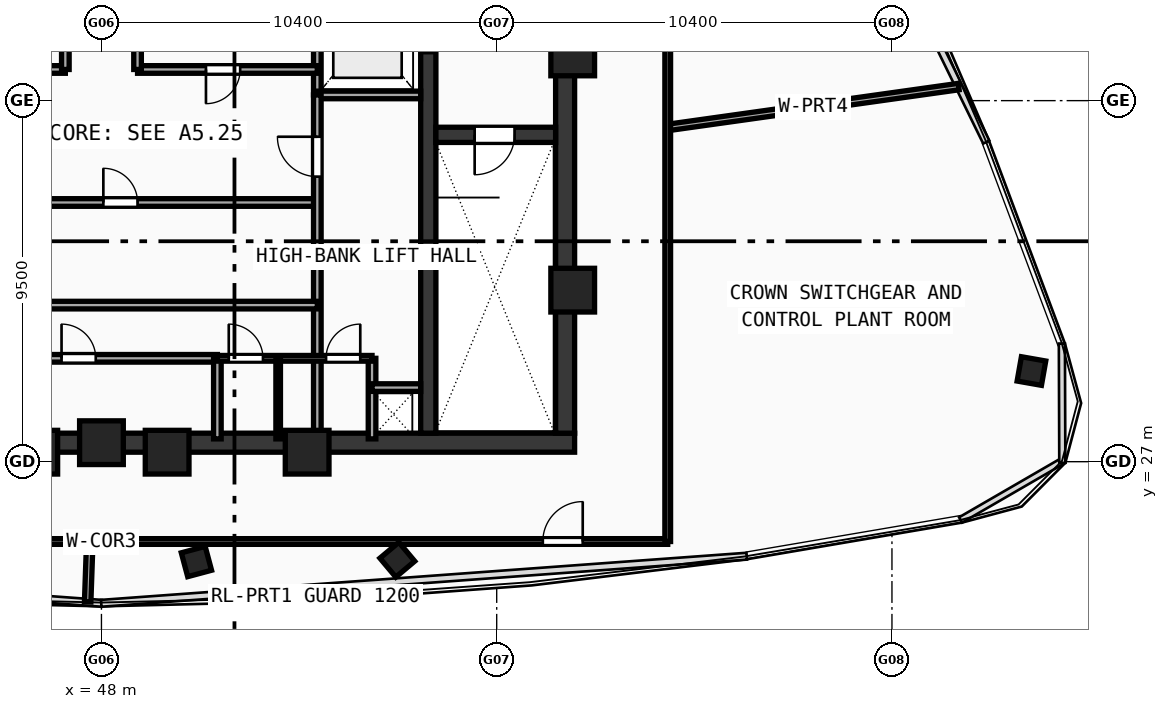
"""IFC4 building model, lengths in metres.
Left out: names, types, materials, properties, quantities, classifications, styles, units other than length and angle.
Written with IfcOpenShell. Run it as: python <this file> out.ifc"""

import sys

from ifc_helpers import new_model, si_unit, direction, frame, frame_2d, origin, origin_with_axes, origin_2d, place, context, subcontext, project, spatial, rectangle, hollow_rectangle, extrude, source, transform, mapped, element, fill, save


model = new_model("IFC4")
c1 = context("Model", 3, precision=1e-05, world=origin(), true_north=direction((0.0, 1.0)))
c2 = subcontext(c1, "Body", "Model", "MODEL_VIEW")
j1 = project(units=[si_unit("LENGTHUNIT", "METRE"), si_unit("PLANEANGLEUNIT", "RADIAN")], contexts=[c1])
p1 = place(None, origin())
s1 = spatial("IfcSite", under=j1, at=p1, CompositionType="ELEMENT")
p2 = place(p1, origin())
s2 = spatial("IfcBuilding", under=s1, at=p2, CompositionType="ELEMENT")
p3 = place(p2, frame((0.0, 0.0, 396.76)))
s3 = spatial("IfcBuildingStorey", under=s2, at=p3, CompositionType="ELEMENT", Elevation=396.76)
p4 = place(p3, frame((35.55, 27.5, 0.0), z_axis=(0.0, 0.0, 1.0), x_axis=(1.0, 0.0, 0.0)))
e1 = element("IfcWall", 1, at=p4, inside=s3, PredefinedType="SHEAR", context=c2, shape_type="SweptSolid", body=[
    extrude(rectangle(XDim=24.9, YDim=0.5, at=frame_2d((12.45, 0.0))), origin(), (0.0, 0.0, 1.0), 4.72),
])
p5 = place(p3, frame((60.2, 27.75, 0.0), z_axis=(0.0, 0.0, 1.0), x_axis=(0.0, 1.0, 0.0)))
e2 = element("IfcWall", 2, at=p5, inside=s3, PredefinedType="SHEAR", context=c2, shape_type="SweptSolid", body=[
    extrude(rectangle(XDim=12.2, YDim=0.5, at=frame_2d((6.1, 0.0))), origin(), (0.0, 0.0, 1.0), 4.72),
])
p6 = place(p3, frame((56.6, 27.75, 0.0), z_axis=(0.0, 0.0, 1.0), x_axis=(0.0, 1.0, 0.0)))
e3 = element("IfcWall", 3, at=p6, inside=s3, PredefinedType="SHEAR", context=c2, shape_type="SweptSolid", body=[
    extrude(rectangle(XDim=12.2, YDim=0.4, at=frame_2d((6.1, 0.0))), origin(), (0.0, 0.0, 1.0), 4.72),
])
p7 = place(p6, frame((10.0, 0.0, 0.0)))
e4 = element("IfcOpeningElement", 4, at=p7, cuts=e3, PredefinedType="OPENING", context=c2, shape_type="SweptSolid", body=[
    extrude(rectangle(XDim=1.1, YDim=2.1, at=frame_2d((0.55, 1.05))), frame((0.0, 0.21, 0.0), z_axis=(0.0, -1.0, 0.0), x_axis=(1.0, 0.0, 0.0)), (0.0, 0.0, 1.0), 0.42),
])
p8 = place(p3, frame((56.8, 35.6, 0.0), z_axis=(0.0, 0.0, 1.0), x_axis=(1.0, 0.0, 0.0)))
e5 = element("IfcWall", 5, at=p8, inside=s3, PredefinedType="SHEAR", context=c2, shape_type="SweptSolid", body=[
    extrude(rectangle(XDim=3.15, YDim=0.4, at=frame_2d((1.575, 0.0))), origin(), (0.0, 0.0, 1.0), 4.72),
])
p9 = place(p8, frame((1.02, 0.0, 0.0)))
e6 = element("IfcOpeningElement", 6, at=p9, cuts=e5, PredefinedType="OPENING", context=c2, shape_type="SweptSolid", body=[
    extrude(rectangle(XDim=1.05, YDim=2.1, at=frame_2d((0.525, 1.05))), frame((0.0, 0.21, 0.0), z_axis=(0.0, -1.0, 0.0), x_axis=(1.0, 0.0, 0.0)), (0.0, 0.0, 1.0), 0.42),
])
m1 = source(origin(), c2, "Body", "SweptSolid", [
    extrude(hollow_rectangle(XDim=1.15, YDim=1.15, WallThickness=0.048, at=origin_2d()), origin(), (0.0, 0.0, 1.0), 5.0),
])
for number, where, z_axis, x_axis in (
    (7, (46.272, 27.25, -0.28), (0.0, 0.0, 1.0), (1.0, 0.0, 0.0)),
    (8, (49.729, 27.25, -0.28), (0.0, 0.0, 1.0), (1.0, 0.0, 0.0)),
    (9, (53.412, 27.25, -0.28), (0.0, 0.0, 1.0), (1.0, 0.0, 0.0)),
    (10, (60.4, 31.513, -0.28), (0.0, 0.0, 1.0), (1.0, 0.0, 0.0)),
    (11, (60.4, 37.729, -0.28), (0.0, 0.0, 1.0), (1.0, 0.0, 0.0)),
):
    element("IfcColumn", number, at=place(p3, frame(where, z_axis=z_axis, x_axis=x_axis)), inside=s3, PredefinedType="COLUMN", context=c2, shape_type="MappedRepresentation", body=[
        mapped(m1, transform((0.0, 0.0, 0.0), scale=1.0)),
    ])
m2 = source(origin(), c2, "Body", "SweptSolid", [
    extrude(hollow_rectangle(XDim=0.65, YDim=0.65, WallThickness=0.024, at=origin_2d()), origin(), (0.0, 0.0, 1.0), 5.0),
])
for number, where, z_axis, x_axis in (
    (12, (50.499, 24.373, -0.28), (0.0, 0.0, 1.0), (0.966, 0.259, 0.0)),
    (13, (55.785, 24.422, -0.28), (0.0, 0.0, 1.0), (0.766, 0.643, 0.0)),
    (14, (72.47, 29.385, -0.28), (0.0, 0.0, 1.0), (0.174, 0.985, 0.0)),
):
    element("IfcColumn", number, at=place(p3, frame(where, z_axis=z_axis, x_axis=x_axis)), inside=s3, PredefinedType="COLUMN", context=c2, shape_type="MappedRepresentation", body=[
        mapped(m2, transform((0.0, 0.0, 0.0), scale=1.0)),
    ])
p10 = place(p3, frame((48.0, 27.5, -0.28), z_axis=(0.0, 0.0, 1.0), x_axis=(1.0, 0.0, 0.0)))
e15 = element("IfcColumn", 15, at=p10, inside=s3, PredefinedType="COLUMN", context=c2, shape_type="MappedRepresentation", body=[
    mapped(m1, transform((0.0, 0.0, 0.0), scale=1.0)),
])
p11 = place(p3, frame((53.68, 36.65, 0.0), z_axis=(0.0, 0.0, 1.0), x_axis=(0.0, 1.0, 0.0)))
e16 = element("IfcWall", 16, at=p11, inside=s3, PredefinedType="SOLIDWALL", context=c2, shape_type="SweptSolid", body=[
    extrude(rectangle(XDim=3.3, YDim=0.2, at=frame_2d((1.65, 0.0))), origin(), (0.0, 0.0, 1.0), 4.72),
])
p12 = place(p3, frame((53.68, 36.65, 0.0), z_axis=(0.0, 0.0, 1.0), x_axis=(1.0, 0.0, 0.0)))
e17 = element("IfcWall", 17, at=p12, inside=s3, PredefinedType="SOLIDWALL", context=c2, shape_type="SweptSolid", body=[
    extrude(rectangle(XDim=2.72, YDim=0.2, at=frame_2d((1.36, 0.0))), origin(), (0.0, 0.0, 1.0), 4.72),
])
p13 = place(p3, frame((42.32, 37.32, 0.0), z_axis=(0.0, 0.0, 1.0), x_axis=(1.0, 0.0, 0.0)))
e18 = element("IfcWall", 18, at=p13, inside=s3, PredefinedType="SOLIDWALL", context=c2, shape_type="SweptSolid", body=[
    extrude(rectangle(XDim=4.73, YDim=0.2, at=frame_2d((2.365, 0.0))), origin(), (0.0, 0.0, 1.0), 4.72),
])
p14 = place(p13, frame((1.8, 0.0, 0.0)))
e19 = element("IfcOpeningElement", 19, at=p14, cuts=e18, PredefinedType="OPENING", context=c2, shape_type="SweptSolid", body=[
    extrude(rectangle(XDim=0.9, YDim=2.1, at=frame_2d((0.45, 1.05))), frame((0.0, 0.11, 0.0), z_axis=(0.0, -1.0, 0.0), x_axis=(1.0, 0.0, 0.0)), (0.0, 0.0, 1.0), 0.22),
])
p15 = place(p3, frame((48.95, 37.32, 0.0), z_axis=(0.0, 0.0, 1.0), x_axis=(1.0, 0.0, 0.0)))
e20 = element("IfcWall", 20, at=p15, inside=s3, PredefinedType="SOLIDWALL", context=c2, shape_type="SweptSolid", body=[
    extrude(rectangle(XDim=4.73, YDim=0.2, at=frame_2d((2.365, 0.0))), origin(), (0.0, 0.0, 1.0), 4.72),
])
p16 = place(p15, frame((1.8, 0.0, 0.0)))
e21 = element("IfcOpeningElement", 21, at=p16, cuts=e20, PredefinedType="OPENING", context=c2, shape_type="SweptSolid", body=[
    extrude(rectangle(XDim=0.9, YDim=2.1, at=frame_2d((0.45, 1.05))), frame((0.0, 0.11, 0.0), z_axis=(0.0, -1.0, 0.0), x_axis=(1.0, 0.0, 0.0)), (0.0, 0.0, 1.0), 0.22),
])
for number, where, z_axis, x_axis in (
    (22, (47.05, 37.32, 0.0), (0.0, 0.0, 1.0), (0.0, 1.0, 0.0)),
    (23, (48.95, 37.32, 0.0), (0.0, 0.0, 1.0), (0.0, 1.0, 0.0)),
):
    element("IfcWall", number, at=place(p3, frame(where, z_axis=z_axis, x_axis=x_axis)), inside=s3, PredefinedType="SOLIDWALL", context=c2, shape_type="SweptSolid", body=[
        extrude(rectangle(XDim=2.63, YDim=0.2, at=frame_2d((1.315, 0.0))), origin(), (0.0, 0.0, 1.0), 4.72),
    ])
p17 = place(p3, frame((43.85, 33.82, 0.0), z_axis=(0.0, 0.0, 1.0), x_axis=(1.0, 0.0, 0.0)))
e24 = element("IfcWall", 24, at=p17, inside=s3, PredefinedType="SOLIDWALL", context=c2, shape_type="SweptSolid", body=[
    extrude(rectangle(XDim=9.83, YDim=0.2, at=frame_2d((4.915, 0.0))), origin(), (0.0, 0.0, 1.0), 4.72),
])
p18 = place(p17, frame((4.2, 0.0, 0.0)))
e25 = element("IfcOpeningElement", 25, at=p18, cuts=e24, PredefinedType="OPENING", context=c2, shape_type="SweptSolid", body=[
    extrude(rectangle(XDim=0.9, YDim=2.1, at=frame_2d((0.45, 1.05))), frame((0.0, 0.11, 0.0), z_axis=(0.0, -1.0, 0.0), x_axis=(1.0, 0.0, 0.0)), (0.0, 0.0, 1.0), 0.22),
])
p19 = place(p3, frame((53.68, 27.6, 0.0), z_axis=(0.0, 0.0, 1.0), x_axis=(0.0, 1.0, 0.0)))
e26 = element("IfcWall", 26, at=p19, inside=s3, PredefinedType="SOLIDWALL", context=c2, shape_type="SweptSolid", body=[
    extrude(rectangle(XDim=9.05, YDim=0.2, at=frame_2d((4.525, 0.0))), origin(), (0.0, 0.0, 1.0), 4.72),
])
p20 = place(p19, frame((6.9, 0.0, 0.0)))
e27 = element("IfcOpeningElement", 27, at=p20, cuts=e26, PredefinedType="OPENING", context=c2, shape_type="SweptSolid", body=[
    extrude(rectangle(XDim=1.05, YDim=2.1, at=frame_2d((0.525, 1.05))), frame((0.0, 0.11, 0.0), z_axis=(0.0, -1.0, 0.0), x_axis=(1.0, 0.0, 0.0)), (0.0, 0.0, 1.0), 0.22),
])
p21 = place(p3, frame((43.85, 29.72, 0.0), z_axis=(0.0, 0.0, 1.0), x_axis=(1.0, 0.0, 0.0)))
e28 = element("IfcWall", 28, at=p21, inside=s3, PredefinedType="SOLIDWALL", context=c2, shape_type="SweptSolid", body=[
    extrude(rectangle(XDim=7.2, YDim=0.2, at=frame_2d((3.6, 0.0))), origin(), (0.0, 0.0, 1.0), 4.72),
])
p22 = place(p21, frame((3.1, 0.0, 0.0)))
e29 = element("IfcOpeningElement", 29, at=p22, cuts=e28, PredefinedType="OPENING", context=c2, shape_type="SweptSolid", body=[
    extrude(rectangle(XDim=0.9, YDim=2.1, at=frame_2d((0.45, 1.05))), frame((0.0, 0.11, 0.0), z_axis=(0.0, -1.0, 0.0), x_axis=(1.0, 0.0, 0.0)), (0.0, 0.0, 1.0), 0.22),
])
p23 = place(p3, frame((51.05, 27.6, 0.0), z_axis=(0.0, 0.0, 1.0), x_axis=(0.0, 1.0, 0.0)))
e30 = element("IfcWall", 30, at=p23, inside=s3, PredefinedType="SOLIDWALL", context=c2, shape_type="SweptSolid", body=[
    extrude(rectangle(XDim=2.12, YDim=0.2, at=frame_2d((1.06, 0.0))), origin(), (0.0, 0.0, 1.0), 4.72),
])
p24 = place(p3, frame((43.85, 31.12, 0.0), z_axis=(0.0, 0.0, 1.0), x_axis=(1.0, 0.0, 0.0)))
e31 = element("IfcWall", 31, at=p24, inside=s3, PredefinedType="SOLIDWALL", context=c2, shape_type="SweptSolid", body=[
    extrude(rectangle(XDim=9.83, YDim=0.2, at=frame_2d((4.915, 0.0))), origin(), (0.0, 0.0, 1.0), 4.72),
])
p25 = place(p3, frame((55.12, 27.6, 0.0), z_axis=(0.0, 0.0, 1.0), x_axis=(0.0, 1.0, 0.0)))
e32 = element("IfcWall", 32, at=p25, inside=s3, PredefinedType="SOLIDWALL", context=c2, shape_type="SweptSolid", body=[
    extrude(rectangle(XDim=2.12, YDim=0.2, at=frame_2d((1.06, 0.0))), origin(), (0.0, 0.0, 1.0), 4.72),
])
p26 = place(p3, frame((55.12, 28.95, 0.0), z_axis=(0.0, 0.0, 1.0), x_axis=(1.0, 0.0, 0.0)))
e33 = element("IfcWall", 33, at=p26, inside=s3, PredefinedType="SOLIDWALL", context=c2, shape_type="SweptSolid", body=[
    extrude(rectangle(XDim=1.28, YDim=0.2, at=frame_2d((0.64, 0.0))), origin(), (0.0, 0.0, 1.0), 4.72),
])
p27 = place(p3, frame((51.05, 29.72, 0.0), z_axis=(0.0, 0.0, 1.0), x_axis=(1.0, 0.0, 0.0)))
e34 = element("IfcWall", 34, at=p27, inside=s3, PredefinedType="PARTITIONING", context=c2, shape_type="SweptSolid", body=[
    extrude(rectangle(XDim=4.07, YDim=0.15, at=frame_2d((2.035, 0.0))), origin(), (0.0, 0.0, 1.0), 4.72),
])
p28 = place(p27, frame((0.3, 0.0, 0.0)))
e35 = element("IfcOpeningElement", 35, at=p28, cuts=e34, PredefinedType="OPENING", context=c2, shape_type="SweptSolid", body=[
    extrude(rectangle(XDim=0.9, YDim=2.1, at=frame_2d((0.45, 1.05))), frame((0.0, 0.085, 0.0), z_axis=(0.0, -1.0, 0.0), x_axis=(1.0, 0.0, 0.0)), (0.0, 0.0, 1.0), 0.17),
])
p29 = place(p27, frame((2.86, 0.0, 0.0)))
e36 = element("IfcOpeningElement", 36, at=p29, cuts=e34, PredefinedType="OPENING", context=c2, shape_type="SweptSolid", body=[
    extrude(rectangle(XDim=0.9, YDim=2.1, at=frame_2d((0.45, 1.05))), frame((0.0, 0.085, 0.0), z_axis=(0.0, -1.0, 0.0), x_axis=(1.0, 0.0, 0.0)), (0.0, 0.0, 1.0), 0.17),
])
p30 = place(p3, frame((52.65, 27.6, 0.0), z_axis=(0.0, 0.0, 1.0), x_axis=(0.0, 1.0, 0.0)))
e37 = element("IfcWall", 37, at=p30, inside=s3, PredefinedType="PARTITIONING", context=c2, shape_type="SweptSolid", body=[
    extrude(rectangle(XDim=2.12, YDim=0.12, at=frame_2d((1.06, 0.0))), origin(), (0.0, 0.0, 1.0), 4.72),
])
p31 = place(p3, frame((62.9, 35.794, 0.0), z_axis=(0.0, 0.0, 1.0), x_axis=(0.990268414718, 0.139170639188, 0.0)))
e38 = element("IfcWall", 38, at=p31, inside=s3, PredefinedType="PARTITIONING", context=c2, shape_type="SweptSolid", body=[
    extrude(rectangle(XDim=7.731, YDim=0.17, at=frame_2d((3.865, 0.0))), origin(), (0.0, 0.0, 1.0), 4.12),
])
p32 = place(p3, frame((47.693, 24.9, 0.0), z_axis=(0.0, 0.0, 1.0), x_axis=(-0.034853599834, -0.999392428718, 0.0)))
e39 = element("IfcWall", 39, at=p32, inside=s3, PredefinedType="PARTITIONING", context=c2, shape_type="SweptSolid", body=[
    extrude(rectangle(XDim=1.59, YDim=0.17, at=frame_2d((0.795, 0.0))), origin(), (0.0, 0.0, 1.0), 4.12),
])
p33 = place(p3, frame((33.1, 24.9, 0.0), z_axis=(0.0, 0.0, 1.0), x_axis=(1.0, 0.0, 0.0)))
e40 = element("IfcWall", 40, at=p33, inside=s3, PredefinedType="PARTITIONING", context=c2, shape_type="SweptSolid", body=[
    extrude(rectangle(XDim=29.8, YDim=0.15, at=frame_2d((14.9, 0.0))), origin(), (0.0, 0.0, 1.0), 4.12),
])
p34 = place(p33, frame((2.236, 0.0, 0.0)))
e41 = element("IfcOpeningElement", 41, at=p34, cuts=e40, PredefinedType="OPENING", context=c2, shape_type="SweptSolid", body=[
    extrude(rectangle(XDim=1.05, YDim=2.1, at=frame_2d((0.525, 1.05))), frame((0.0, 0.085, 0.0), z_axis=(0.0, -1.0, 0.0), x_axis=(1.0, 0.0, 0.0)), (0.0, 0.0, 1.0), 0.17),
])
p35 = place(p33, frame((26.514, 0.0, 0.0)))
e42 = element("IfcOpeningElement", 42, at=p35, cuts=e40, PredefinedType="OPENING", context=c2, shape_type="SweptSolid", body=[
    extrude(rectangle(XDim=1.05, YDim=2.1, at=frame_2d((0.525, 1.05))), frame((0.0, 0.085, 0.0), z_axis=(0.0, -1.0, 0.0), x_axis=(1.0, 0.0, 0.0)), (0.0, 0.0, 1.0), 0.17),
])
p36 = place(p3, frame((62.9, 24.9, 0.0), z_axis=(0.0, 0.0, 1.0), x_axis=(0.0, 1.0, 0.0)))
e43 = element("IfcWall", 43, at=p36, inside=s3, PredefinedType="PARTITIONING", context=c2, shape_type="SweptSolid", body=[
    extrude(rectangle(XDim=18.0, YDim=0.15, at=frame_2d((9.0, 0.0))), origin(), (0.0, 0.0, 1.0), 4.12),
])
m3 = source(origin(), c2, "Body", "SweptSolid", [
    extrude(rectangle(XDim=1.05, YDim=2.1, at=frame_2d((0.525, 1.05))), frame((0.0, 0.025, 0.0), z_axis=(0.0, -1.0, 0.0), x_axis=(1.0, 0.0, 0.0)), (0.0, 0.0, 1.0), 0.05),
])
p37 = place(p9, frame((1.05, 0.0, 0.0), z_axis=(0.0, 0.0, 1.0), x_axis=(-1.0, 0.0, 0.0)))
e44 = element("IfcDoor", 44, at=p37, inside=s3, OperationType="SINGLE_SWING_RIGHT", PredefinedType="DOOR", context=c2, shape_type="MappedRepresentation", body=[
    mapped(m3, transform((0.0, 0.0, 0.0), scale=1.0)),
])
fill(e6, e44)
m4 = source(origin(), c2, "Body", "SweptSolid", [
    extrude(rectangle(XDim=1.1, YDim=2.1, at=frame_2d((0.55, 1.05))), frame((0.0, 0.025, 0.0), z_axis=(0.0, -1.0, 0.0), x_axis=(1.0, 0.0, 0.0)), (0.0, 0.0, 1.0), 0.05),
])
p38 = place(p7, origin_with_axes())
e45 = element("IfcDoor", 45, at=p38, inside=s3, OperationType="DOUBLE_DOOR_SLIDING", PredefinedType="DOOR", context=c2, shape_type="MappedRepresentation", body=[
    mapped(m4, transform((0.0, 0.0, 0.0), scale=1.0)),
])
fill(e4, e45)
m5 = source(origin(), c2, "Body", "SweptSolid", [
    extrude(rectangle(XDim=0.9, YDim=2.1, at=frame_2d((0.45, 1.05))), frame((0.0, 0.025, 0.0), z_axis=(0.0, -1.0, 0.0), x_axis=(1.0, 0.0, 0.0)), (0.0, 0.0, 1.0), 0.05),
])
p39 = place(p16, frame((0.9, 0.0, 0.0), z_axis=(0.0, 0.0, 1.0), x_axis=(-1.0, 0.0, 0.0)))
e46 = element("IfcDoor", 46, at=p39, inside=s3, OperationType="SINGLE_SWING_RIGHT", PredefinedType="DOOR", context=c2, shape_type="MappedRepresentation", body=[
    mapped(m5, transform((0.0, 0.0, 0.0), scale=1.0)),
])
fill(e21, e46)
p40 = place(p18, origin_with_axes())
e47 = element("IfcDoor", 47, at=p40, inside=s3, OperationType="SINGLE_SWING_LEFT", PredefinedType="DOOR", context=c2, shape_type="MappedRepresentation", body=[
    mapped(m5, transform((0.0, 0.0, 0.0), scale=1.0)),
])
fill(e25, e47)
p41 = place(p20, origin_with_axes())
e48 = element("IfcDoor", 48, at=p41, inside=s3, OperationType="SINGLE_SWING_RIGHT", PredefinedType="DOOR", context=c2, shape_type="MappedRepresentation", body=[
    mapped(m3, transform((0.0, 0.0, 0.0), scale=1.0)),
])
fill(e27, e48)
p42 = place(p22, origin_with_axes())
e49 = element("IfcDoor", 49, at=p42, inside=s3, OperationType="SINGLE_SWING_LEFT", PredefinedType="DOOR", context=c2, shape_type="MappedRepresentation", body=[
    mapped(m5, transform((0.0, 0.0, 0.0), scale=1.0)),
])
fill(e29, e49)
p43 = place(p28, origin_with_axes())
e50 = element("IfcDoor", 50, at=p43, inside=s3, OperationType="SINGLE_SWING_LEFT", PredefinedType="DOOR", context=c2, shape_type="MappedRepresentation", body=[
    mapped(m5, transform((0.0, 0.0, 0.0), scale=1.0)),
])
fill(e35, e50)
p44 = place(p29, origin_with_axes())
e51 = element("IfcDoor", 51, at=p44, inside=s3, OperationType="SINGLE_SWING_RIGHT", PredefinedType="DOOR", context=c2, shape_type="MappedRepresentation", body=[
    mapped(m5, transform((0.0, 0.0, 0.0), scale=1.0)),
])
fill(e36, e51)
p45 = place(p35, origin_with_axes())
e52 = element("IfcDoor", 52, at=p45, inside=s3, OperationType="SINGLE_SWING_RIGHT", PredefinedType="DOOR", context=c2, shape_type="MappedRepresentation", body=[
    mapped(m3, transform((0.0, 0.0, 0.0), scale=1.0)),
])
fill(e42, e52)
save(model, sys.argv[1])
